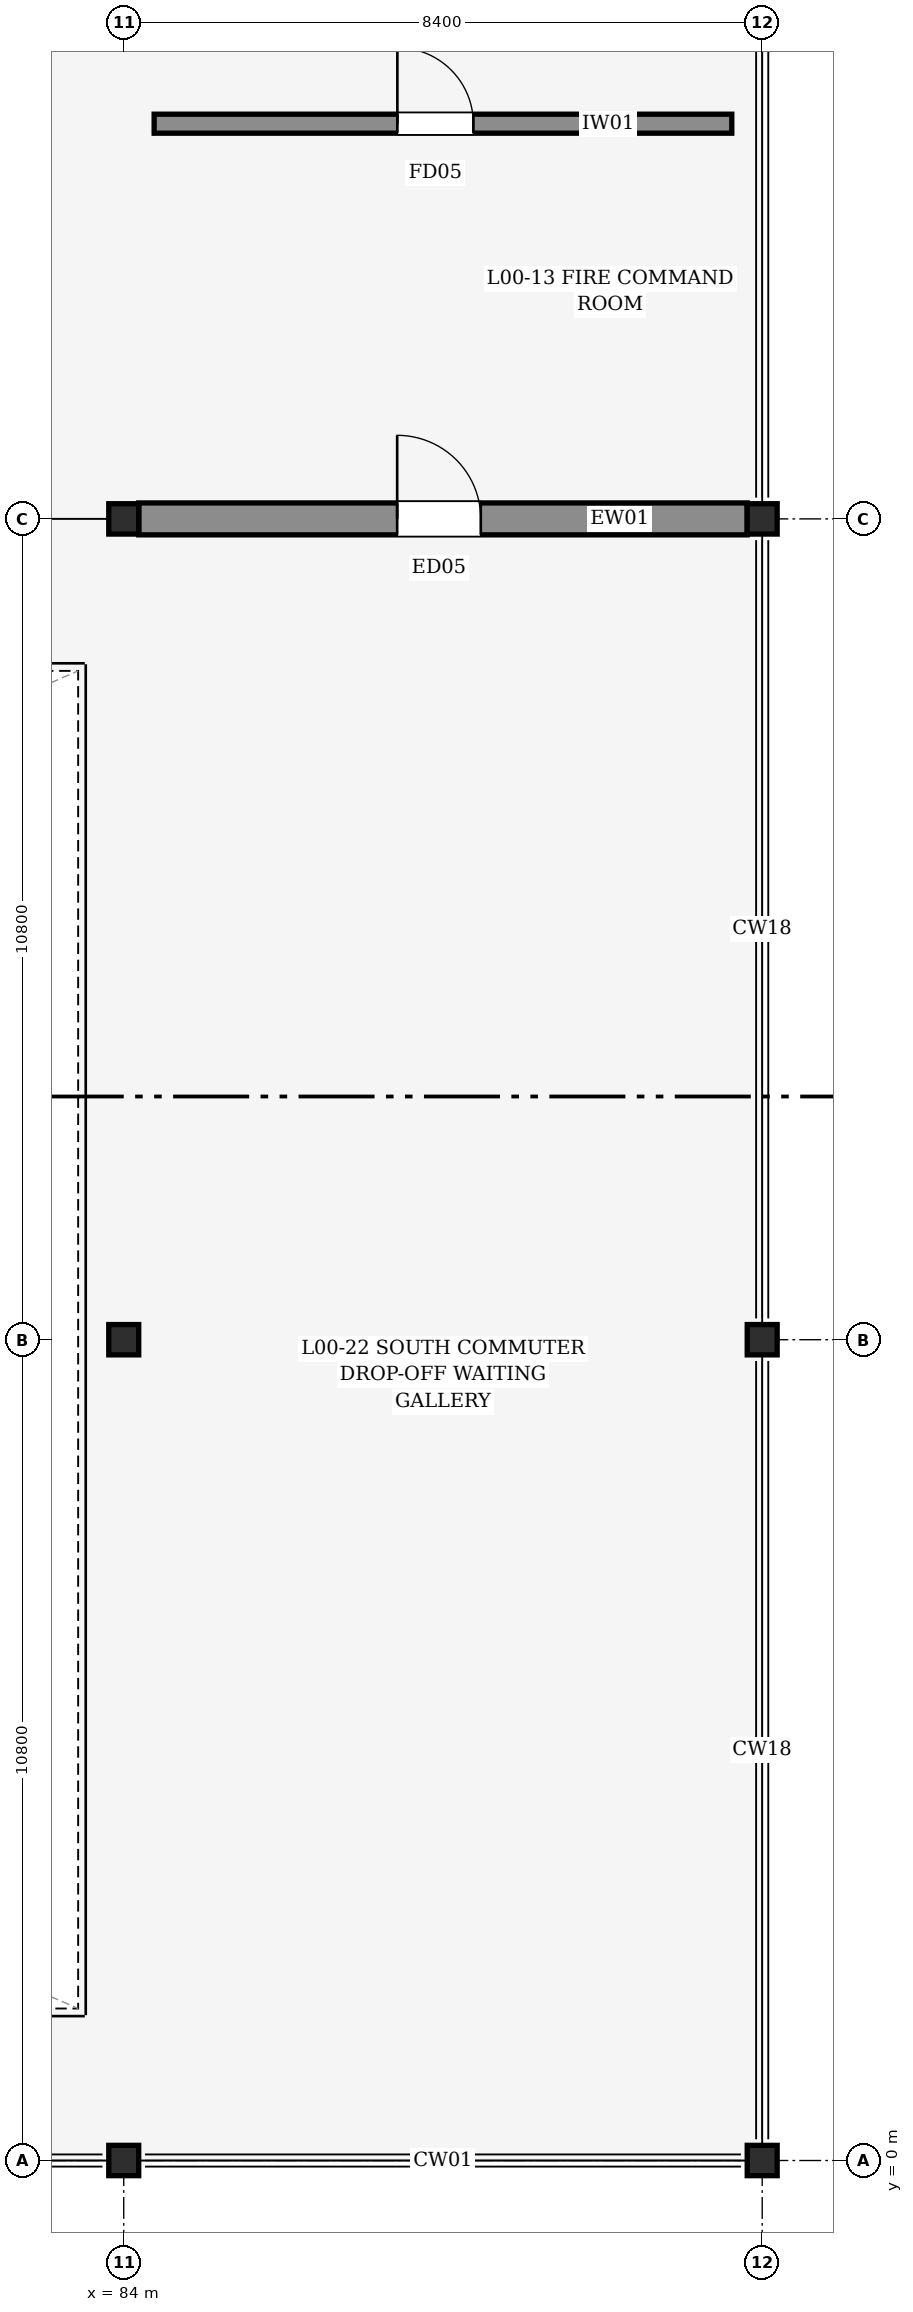
"""IFC4 building model, lengths in metres.
Left out: names, types, materials, properties, quantities, classifications, styles, units other than length and angle.
Written with IfcOpenShell. Run it as: python <this file> out.ifc"""

import sys

from ifc_helpers import new_model, si_unit, direction, frame, frame_2d, origin, origin_2d, place, context, subcontext, project, spatial, rectangle, i_section, extrude, element, fill, save


model = new_model("IFC4")
c1 = context("Model", 3, precision=1e-05, world=origin(), true_north=direction((0.0, 1.0)))
c2 = subcontext(c1, "Body", "Model", "MODEL_VIEW")
j1 = project(units=[si_unit("LENGTHUNIT", "METRE"), si_unit("PLANEANGLEUNIT", "RADIAN")], contexts=[c1])
p1 = place(None, origin())
s1 = spatial("IfcSite", under=j1, at=p1, CompositionType="ELEMENT")
p2 = place(p1, origin())
s2 = spatial("IfcBuilding", under=s1, at=p2, CompositionType="ELEMENT")
p3 = place(p2, origin())
s3 = spatial("IfcBuildingStorey", under=s2, at=p3, CompositionType="ELEMENT", Elevation=0.0)
for number, where, z_axis, x_axis in (
    (1, (84.0, 0.0, 0.0), (0.0, 0.0, 1.0), (1.0, 0.0, 0.0)),
    (2, (84.0, 10.8, 0.0), (0.0, 0.0, 1.0), (1.0, 0.0, 0.0)),
    (3, (84.0, 21.6, 0.0), (0.0, 0.0, 1.0), (1.0, 0.0, 0.0)),
    (4, (92.4, 0.0, 0.0), (0.0, 0.0, 1.0), (1.0, 0.0, 0.0)),
    (5, (92.4, 10.8, 0.0), (0.0, 0.0, 1.0), (1.0, 0.0, 0.0)),
    (6, (92.4, 21.6, 0.0), (0.0, 0.0, 1.0), (1.0, 0.0, 0.0)),
):
    element("IfcColumn", number, at=place(p3, frame(where, z_axis=z_axis, x_axis=x_axis)), inside=s3, PredefinedType="COLUMN", context=c2, shape_type="SweptSolid", body=[
        extrude(i_section(OverallWidth=0.399, OverallDepth=0.394, WebThickness=0.023, FlangeThickness=0.037, FilletRadius=0.015, at=origin_2d()), origin(), (0.0, 0.0, 1.0), 5.4),
    ])
p4 = place(p3, frame((84.198, 21.6, 0.0), z_axis=(0.0, 0.0, 1.0), x_axis=(1.0, 0.0, 0.0)))
e7 = element("IfcWall", 7, at=p4, inside=s3, PredefinedType="STANDARD", context=c2, shape_type="SweptSolid", body=[
    extrude(rectangle(XDim=8.005, YDim=0.42, at=frame_2d((4.002, 0.0))), origin(), (0.0, 0.0, 1.0), 4.335),
])
p5 = place(p4, frame((3.4, 0.0, 0.0)))
e8 = element("IfcOpeningElement", 8, at=p5, cuts=e7, PredefinedType="OPENING", context=c2, shape_type="SweptSolid", body=[
    extrude(rectangle(XDim=1.1, YDim=2.15, at=frame_2d((0.55, 1.075))), frame((0.0, 0.22, 0.0), z_axis=(0.0, -1.0, 0.0), x_axis=(1.0, 0.0, 0.0)), (0.0, 0.0, 1.0), 0.44),
])
p6 = place(p3, frame((84.4, 26.8, 0.0), z_axis=(0.0, 0.0, 1.0), x_axis=(1.0, 0.0, 0.0)))
e9 = element("IfcWall", 9, at=p6, inside=s3, PredefinedType="PARTITIONING", context=c2, shape_type="SweptSolid", body=[
    extrude(rectangle(XDim=7.6, YDim=0.25, at=frame_2d((3.8, 0.0))), origin(), (0.0, 0.0, 1.0), 4.325),
])
p7 = place(p6, frame((3.2, 0.0, 0.0)))
e10 = element("IfcOpeningElement", 10, at=p7, cuts=e9, PredefinedType="OPENING", context=c2, shape_type="SweptSolid", body=[
    extrude(rectangle(XDim=1.0, YDim=2.15, at=frame_2d((0.5, 1.075))), frame((0.0, 0.135, 0.0), z_axis=(0.0, -1.0, 0.0), x_axis=(1.0, 0.0, 0.0)), (0.0, 0.0, 1.0), 0.27),
])
p8 = place(p5, frame((1.1, 0.0, 0.0), z_axis=(0.0, 0.0, 1.0), x_axis=(-1.0, 0.0, 0.0)))
e11 = element("IfcDoor", 11, at=p8, inside=s3, OperationType="SINGLE_SWING_RIGHT", PredefinedType="DOOR", context=c2, shape_type="SweptSolid", body=[
    extrude(rectangle(XDim=1.1, YDim=2.15, at=frame_2d((0.55, 1.075))), frame((0.0, 0.025, 0.0), z_axis=(0.0, -1.0, 0.0), x_axis=(1.0, 0.0, 0.0)), (0.0, 0.0, 1.0), 0.05),
])
fill(e8, e11)
p9 = place(p7, origin())
e12 = element("IfcDoor", 12, at=p9, inside=s3, OperationType="SINGLE_SWING_LEFT", PredefinedType="DOOR", context=c2, shape_type="SweptSolid", body=[
    extrude(rectangle(XDim=1.0, YDim=2.15, at=frame_2d((0.5, 1.075))), frame((0.0, 0.025, 0.0), z_axis=(0.0, -1.0, 0.0), x_axis=(1.0, 0.0, 0.0)), (0.0, 0.0, 1.0), 0.05),
])
fill(e10, e12)
save(model, sys.argv[1])
